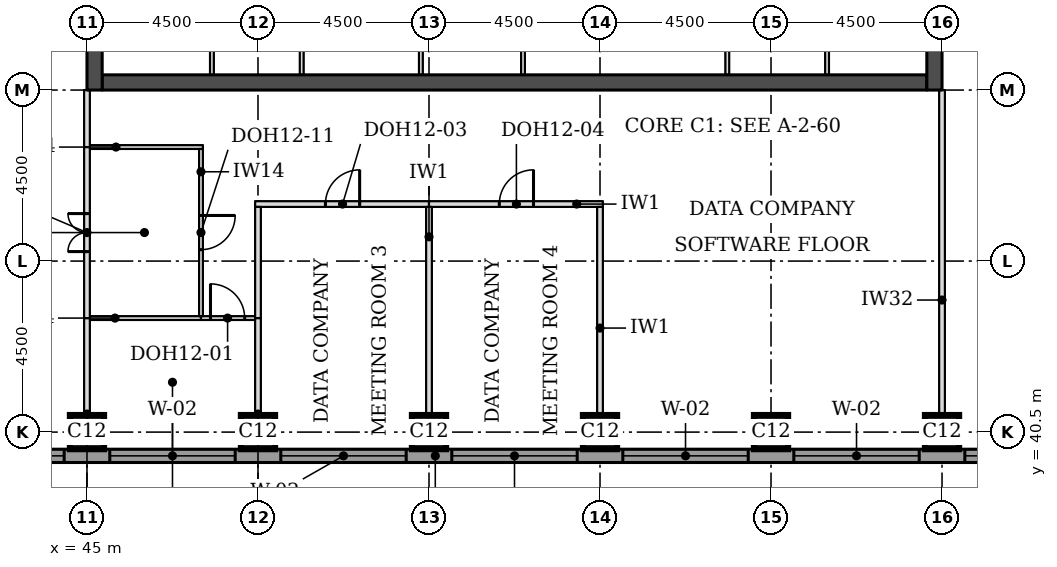
"""IFC4 building model, lengths in metres.
Left out: names, types, materials, properties, quantities, classifications, styles, units other than length and angle.
Written with IfcOpenShell. Run it as: python <this file> out.ifc"""

import sys

from ifc_helpers import new_model, si_unit, direction, frame, frame_2d, origin, origin_2d, place, context, subcontext, project, spatial, rectangle, extrude, element, fill, save


model = new_model("IFC4")
c1 = context("Model", 3, precision=1e-05, world=origin(), true_north=direction((0.0, 1.0)))
c2 = subcontext(c1, "Body", "Model", "MODEL_VIEW")
j1 = project(units=[si_unit("LENGTHUNIT", "METRE"), si_unit("PLANEANGLEUNIT", "RADIAN")], contexts=[c1])
p1 = place(None, origin())
s1 = spatial("IfcSite", under=j1, at=p1, CompositionType="ELEMENT")
p2 = place(p1, origin())
s2 = spatial("IfcBuilding", under=s1, at=p2, CompositionType="ELEMENT")
p3 = place(p2, frame((0.0, 0.0, 248.9)))
s3 = spatial("IfcBuildingStorey", under=s2, at=p3, CompositionType="ELEMENT", Elevation=248.9)
for number, where, z_axis, x_axis in (
    (1, (45.0, 40.5, 0.0), (0.0, 0.0, 1.0), (1.0, 0.0, 0.0)),
    (2, (49.5, 40.5, 0.0), (0.0, 0.0, 1.0), (1.0, 0.0, 0.0)),
    (3, (54.0, 40.5, 0.0), (0.0, 0.0, 1.0), (1.0, 0.0, 0.0)),
    (4, (58.5, 40.5, 0.0), (0.0, 0.0, 1.0), (1.0, 0.0, 0.0)),
    (5, (63.0, 40.5, 0.0), (0.0, 0.0, 1.0), (1.0, 0.0, 0.0)),
    (6, (67.5, 40.5, 0.0), (0.0, 0.0, 1.0), (1.0, 0.0, 0.0)),
):
    element("IfcColumn", number, at=place(p3, frame(where, z_axis=z_axis, x_axis=x_axis)), inside=s3, PredefinedType="COLUMN", context=c2, shape_type="SweptSolid", body=[
        extrude(rectangle(XDim=0.9, YDim=0.9, at=origin_2d()), origin(), (0.0, 0.0, 1.0), 3.7),
    ])
p4 = place(p3, frame((45.4, 49.7, 0.0), z_axis=(0.0, 0.0, 1.0), x_axis=(1.0, 0.0, 0.0)))
e7 = element("IfcWall", 7, at=p4, inside=s3, PredefinedType="SHEAR", context=c2, shape_type="SweptSolid", body=[
    extrude(rectangle(XDim=21.7, YDim=0.4, at=frame_2d((10.85, 0.0))), origin(), (0.0, 0.0, 1.0), 3.7),
])
p5 = place(p3, frame((45.2, 49.5, 0.0), z_axis=(0.0, 0.0, 1.0), x_axis=(0.0, 1.0, 0.0)))
e8 = element("IfcWall", 8, at=p5, inside=s3, PredefinedType="SHEAR", context=c2, shape_type="SweptSolid", body=[
    extrude(rectangle(XDim=22.5, YDim=0.4, at=frame_2d((11.25, 0.0))), origin(), (0.0, 0.0, 1.0), 3.7),
])
p6 = place(p5, frame((4.2, 0.0, 0.0)))
e9 = element("IfcOpeningElement", 9, at=p6, cuts=e8, PredefinedType="OPENING", context=c2, shape_type="SweptSolid", body=[
    extrude(rectangle(XDim=1.8, YDim=2.1, at=frame_2d((0.9, 1.05))), frame((0.0, 0.21, 0.0), z_axis=(0.0, -1.0, 0.0), x_axis=(1.0, 0.0, 0.0)), (0.0, 0.0, 1.0), 0.42),
])
p7 = place(p5, frame((6.9, 0.0, 0.0)))
e10 = element("IfcOpeningElement", 10, at=p7, cuts=e8, PredefinedType="OPENING", context=c2, shape_type="SweptSolid", body=[
    extrude(rectangle(XDim=1.1, YDim=2.1, at=frame_2d((0.55, 1.05))), frame((0.0, 0.21, 0.0), z_axis=(0.0, -1.0, 0.0), x_axis=(1.0, 0.0, 0.0)), (0.0, 0.0, 1.0), 0.42),
])
p8 = place(p5, frame((13.6, 0.0, 0.0)))
e11 = element("IfcOpeningElement", 11, at=p8, cuts=e8, PredefinedType="OPENING", context=c2, shape_type="SweptSolid", body=[
    extrude(rectangle(XDim=1.1, YDim=2.1, at=frame_2d((0.55, 1.05))), frame((0.0, 0.21, 0.0), z_axis=(0.0, -1.0, 0.0), x_axis=(1.0, 0.0, 0.0)), (0.0, 0.0, 1.0), 0.42),
])
p9 = place(p5, frame((16.5, 0.0, 0.0)))
e12 = element("IfcOpeningElement", 12, at=p9, cuts=e8, PredefinedType="OPENING", context=c2, shape_type="SweptSolid", body=[
    extrude(rectangle(XDim=1.8, YDim=2.1, at=frame_2d((0.9, 1.05))), frame((0.0, 0.21, 0.0), z_axis=(0.0, -1.0, 0.0), x_axis=(1.0, 0.0, 0.0)), (0.0, 0.0, 1.0), 0.42),
])
p10 = place(p3, frame((67.3, 49.5, 0.0), z_axis=(0.0, 0.0, 1.0), x_axis=(0.0, 1.0, 0.0)))
e13 = element("IfcWall", 13, at=p10, inside=s3, PredefinedType="SHEAR", context=c2, shape_type="SweptSolid", body=[
    extrude(rectangle(XDim=22.5, YDim=0.4, at=frame_2d((11.25, 0.0))), origin(), (0.0, 0.0, 1.0), 3.7),
])
p11 = place(p10, frame((4.2, 0.0, 0.0)))
e14 = element("IfcOpeningElement", 14, at=p11, cuts=e13, PredefinedType="OPENING", context=c2, shape_type="SweptSolid", body=[
    extrude(rectangle(XDim=1.8, YDim=2.1, at=frame_2d((0.9, 1.05))), frame((0.0, 0.21, 0.0), z_axis=(0.0, -1.0, 0.0), x_axis=(1.0, 0.0, 0.0)), (0.0, 0.0, 1.0), 0.42),
])
p12 = place(p10, frame((6.9, 0.0, 0.0)))
e15 = element("IfcOpeningElement", 15, at=p12, cuts=e13, PredefinedType="OPENING", context=c2, shape_type="SweptSolid", body=[
    extrude(rectangle(XDim=1.1, YDim=2.1, at=frame_2d((0.55, 1.05))), frame((0.0, 0.21, 0.0), z_axis=(0.0, -1.0, 0.0), x_axis=(1.0, 0.0, 0.0)), (0.0, 0.0, 1.0), 0.42),
])
p13 = place(p10, frame((13.6, 0.0, 0.0)))
e16 = element("IfcOpeningElement", 16, at=p13, cuts=e13, PredefinedType="OPENING", context=c2, shape_type="SweptSolid", body=[
    extrude(rectangle(XDim=1.1, YDim=2.1, at=frame_2d((0.55, 1.05))), frame((0.0, 0.21, 0.0), z_axis=(0.0, -1.0, 0.0), x_axis=(1.0, 0.0, 0.0)), (0.0, 0.0, 1.0), 0.42),
])
p14 = place(p10, frame((16.5, 0.0, 0.0)))
e17 = element("IfcOpeningElement", 17, at=p14, cuts=e13, PredefinedType="OPENING", context=c2, shape_type="SweptSolid", body=[
    extrude(rectangle(XDim=1.8, YDim=2.1, at=frame_2d((0.9, 1.05))), frame((0.0, 0.21, 0.0), z_axis=(0.0, -1.0, 0.0), x_axis=(1.0, 0.0, 0.0)), (0.0, 0.0, 1.0), 0.42),
])
p15 = place(p3, frame((36.0, 39.875, 0.0), z_axis=(0.0, 0.0, 1.0), x_axis=(1.0, 0.0, 0.0)))
e18 = element("IfcWall", 18, at=p15, inside=s3, PredefinedType="STANDARD", context=c2, shape_type="SweptSolid", body=[
    extrude(rectangle(XDim=36.331, YDim=0.35, at=frame_2d((18.166, 0.0))), origin(), (0.0, 0.0, 1.0), 3.525),
])
p16 = place(p15, frame((0.6, 0.0, 0.9)))
e19 = element("IfcOpeningElement", 19, at=p16, cuts=e18, PredefinedType="OPENING", context=c2, shape_type="SweptSolid", body=[
    extrude(rectangle(XDim=3.3, YDim=1.9, at=frame_2d((1.65, 0.95))), frame((0.0, 0.185, 0.0), z_axis=(0.0, -1.0, 0.0), x_axis=(1.0, 0.0, 0.0)), (0.0, 0.0, 1.0), 0.37),
])
p17 = place(p15, frame((5.1, 0.0, 0.9)))
e20 = element("IfcOpeningElement", 20, at=p17, cuts=e18, PredefinedType="OPENING", context=c2, shape_type="SweptSolid", body=[
    extrude(rectangle(XDim=3.3, YDim=1.9, at=frame_2d((1.65, 0.95))), frame((0.0, 0.185, 0.0), z_axis=(0.0, -1.0, 0.0), x_axis=(1.0, 0.0, 0.0)), (0.0, 0.0, 1.0), 0.37),
])
p18 = place(p15, frame((9.6, 0.0, 0.9)))
e21 = element("IfcOpeningElement", 21, at=p18, cuts=e18, PredefinedType="OPENING", context=c2, shape_type="SweptSolid", body=[
    extrude(rectangle(XDim=3.3, YDim=1.9, at=frame_2d((1.65, 0.95))), frame((0.0, 0.185, 0.0), z_axis=(0.0, -1.0, 0.0), x_axis=(1.0, 0.0, 0.0)), (0.0, 0.0, 1.0), 0.37),
])
p19 = place(p15, frame((14.1, 0.0, 0.9)))
e22 = element("IfcOpeningElement", 22, at=p19, cuts=e18, PredefinedType="OPENING", context=c2, shape_type="SweptSolid", body=[
    extrude(rectangle(XDim=3.3, YDim=1.9, at=frame_2d((1.65, 0.95))), frame((0.0, 0.185, 0.0), z_axis=(0.0, -1.0, 0.0), x_axis=(1.0, 0.0, 0.0)), (0.0, 0.0, 1.0), 0.37),
])
p20 = place(p15, frame((18.6, 0.0, 0.9)))
e23 = element("IfcOpeningElement", 23, at=p20, cuts=e18, PredefinedType="OPENING", context=c2, shape_type="SweptSolid", body=[
    extrude(rectangle(XDim=3.3, YDim=1.9, at=frame_2d((1.65, 0.95))), frame((0.0, 0.185, 0.0), z_axis=(0.0, -1.0, 0.0), x_axis=(1.0, 0.0, 0.0)), (0.0, 0.0, 1.0), 0.37),
])
p21 = place(p15, frame((23.1, 0.0, 0.9)))
e24 = element("IfcOpeningElement", 24, at=p21, cuts=e18, PredefinedType="OPENING", context=c2, shape_type="SweptSolid", body=[
    extrude(rectangle(XDim=3.3, YDim=1.9, at=frame_2d((1.65, 0.95))), frame((0.0, 0.185, 0.0), z_axis=(0.0, -1.0, 0.0), x_axis=(1.0, 0.0, 0.0)), (0.0, 0.0, 1.0), 0.37),
])
p22 = place(p15, frame((27.6, 0.0, 0.9)))
e25 = element("IfcOpeningElement", 25, at=p22, cuts=e18, PredefinedType="OPENING", context=c2, shape_type="SweptSolid", body=[
    extrude(rectangle(XDim=3.3, YDim=1.9, at=frame_2d((1.65, 0.95))), frame((0.0, 0.185, 0.0), z_axis=(0.0, -1.0, 0.0), x_axis=(1.0, 0.0, 0.0)), (0.0, 0.0, 1.0), 0.37),
])
p23 = place(p15, frame((32.1, 0.0, 0.9)))
e26 = element("IfcOpeningElement", 26, at=p23, cuts=e18, PredefinedType="OPENING", context=c2, shape_type="SweptSolid", body=[
    extrude(rectangle(XDim=3.3, YDim=1.9, at=frame_2d((1.65, 0.95))), frame((0.0, 0.185, 0.0), z_axis=(0.0, -1.0, 0.0), x_axis=(1.0, 0.0, 0.0)), (0.0, 0.0, 1.0), 0.37),
])
p24 = place(p3, frame((45.075, 43.5, 0.0), z_axis=(0.0, 0.0, 1.0), x_axis=(1.0, 0.0, 0.0)))
e27 = element("IfcWall", 27, at=p24, inside=s3, PredefinedType="PARTITIONING", context=c2, shape_type="SweptSolid", body=[
    extrude(rectangle(XDim=2.925, YDim=0.1, at=frame_2d((1.462, 0.0))), origin(), (0.0, 0.0, 1.0), 3.55),
])
p25 = place(p3, frame((48.0, 43.5, 0.0), z_axis=(0.0, 0.0, 1.0), x_axis=(1.0, 0.0, 0.0)))
e28 = element("IfcWall", 28, at=p25, inside=s3, PredefinedType="PARTITIONING", context=c2, shape_type="SweptSolid", body=[
    extrude(rectangle(XDim=1.425, YDim=0.1, at=frame_2d((0.712, 0.0))), origin(), (0.0, 0.0, 1.0), 3.55),
])
p26 = place(p25, frame((0.25, 0.0, 0.0)))
e29 = element("IfcOpeningElement", 29, at=p26, cuts=e28, PredefinedType="OPENING", context=c2, shape_type="SweptSolid", body=[
    extrude(rectangle(XDim=0.9, YDim=2.1, at=frame_2d((0.45, 1.05))), frame((0.0, 0.06, 0.0), z_axis=(0.0, -1.0, 0.0), x_axis=(1.0, 0.0, 0.0)), (0.0, 0.0, 1.0), 0.12),
])
p27 = place(p3, frame((49.425, 46.5, 0.0), z_axis=(0.0, 0.0, 1.0), x_axis=(1.0, 0.0, 0.0)))
e30 = element("IfcWall", 30, at=p27, inside=s3, PredefinedType="PARTITIONING", context=c2, shape_type="SweptSolid", body=[
    extrude(rectangle(XDim=4.575, YDim=0.15, at=frame_2d((2.288, 0.0))), origin(), (0.0, 0.0, 1.0), 3.55),
])
p28 = place(p27, frame((1.85, 0.0, 0.0)))
e31 = element("IfcOpeningElement", 31, at=p28, cuts=e30, PredefinedType="OPENING", context=c2, shape_type="SweptSolid", body=[
    extrude(rectangle(XDim=0.9, YDim=2.1, at=frame_2d((0.45, 1.05))), frame((0.0, 0.085, 0.0), z_axis=(0.0, -1.0, 0.0), x_axis=(1.0, 0.0, 0.0)), (0.0, 0.0, 1.0), 0.17),
])
p29 = place(p3, frame((54.0, 46.5, 0.0), z_axis=(0.0, 0.0, 1.0), x_axis=(1.0, 0.0, 0.0)))
e32 = element("IfcWall", 32, at=p29, inside=s3, PredefinedType="PARTITIONING", context=c2, shape_type="SweptSolid", body=[
    extrude(rectangle(XDim=4.575, YDim=0.15, at=frame_2d((2.288, 0.0))), origin(), (0.0, 0.0, 1.0), 3.55),
])
p30 = place(p29, frame((1.85, 0.0, 0.0)))
e33 = element("IfcOpeningElement", 33, at=p30, cuts=e32, PredefinedType="OPENING", context=c2, shape_type="SweptSolid", body=[
    extrude(rectangle(XDim=0.9, YDim=2.1, at=frame_2d((0.45, 1.05))), frame((0.0, 0.085, 0.0), z_axis=(0.0, -1.0, 0.0), x_axis=(1.0, 0.0, 0.0)), (0.0, 0.0, 1.0), 0.17),
])
p31 = place(p3, frame((45.075, 48.0, 0.0), z_axis=(0.0, 0.0, 1.0), x_axis=(1.0, 0.0, 0.0)))
e34 = element("IfcWall", 34, at=p31, inside=s3, PredefinedType="PARTITIONING", context=c2, shape_type="SweptSolid", body=[
    extrude(rectangle(XDim=2.975, YDim=0.1, at=frame_2d((1.488, 0.0))), origin(), (0.0, 0.0, 1.0), 3.55),
])
p32 = place(p3, frame((45.0, 40.05, 0.0), z_axis=(0.0, 0.0, 1.0), x_axis=(0.0, 1.0, 0.0)))
e35 = element("IfcWall", 35, at=p32, inside=s3, PredefinedType="PARTITIONING", context=c2, shape_type="SweptSolid", body=[
    extrude(rectangle(XDim=3.45, YDim=0.15, at=frame_2d((1.725, 0.0))), origin(), (0.0, 0.0, 1.0), 3.022),
])
p33 = place(p3, frame((49.5, 40.05, 0.0), z_axis=(0.0, 0.0, 1.0), x_axis=(0.0, 1.0, 0.0)))
e36 = element("IfcWall", 36, at=p33, inside=s3, PredefinedType="PARTITIONING", context=c2, shape_type="SweptSolid", body=[
    extrude(rectangle(XDim=3.45, YDim=0.15, at=frame_2d((1.725, 0.0))), origin(), (0.0, 0.0, 1.0), 3.55),
])
for number, where, z_axis, x_axis in (
    (37, (54.0, 40.05, 0.0), (0.0, 0.0, 1.0), (0.0, 1.0, 0.0)),
    (38, (58.5, 40.05, 0.0), (0.0, 0.0, 1.0), (0.0, 1.0, 0.0)),
):
    element("IfcWall", number, at=place(p3, frame(where, z_axis=z_axis, x_axis=x_axis)), inside=s3, PredefinedType="PARTITIONING", context=c2, shape_type="SweptSolid", body=[
        extrude(rectangle(XDim=6.375, YDim=0.15, at=frame_2d((3.188, 0.0))), origin(), (0.0, 0.0, 1.0), 3.55),
    ])
p34 = place(p3, frame((67.5, 40.05, 0.0), z_axis=(0.0, 0.0, 1.0), x_axis=(0.0, 1.0, 0.0)))
e39 = element("IfcWall", 39, at=p34, inside=s3, PredefinedType="PARTITIONING", context=c2, shape_type="SweptSolid", body=[
    extrude(rectangle(XDim=9.45, YDim=0.15, at=frame_2d((4.725, 0.0))), origin(), (0.0, 0.0, 1.0), 3.022),
])
p35 = place(p3, frame((45.0, 43.5, 0.0), z_axis=(0.0, 0.0, 1.0), x_axis=(0.0, 1.0, 0.0)))
e40 = element("IfcWall", 40, at=p35, inside=s3, PredefinedType="PARTITIONING", context=c2, shape_type="SweptSolid", body=[
    extrude(rectangle(XDim=4.5, YDim=0.15, at=frame_2d((2.25, 0.0))), origin(), (0.0, 0.0, 1.0), 3.022),
])
p36 = place(p35, frame((1.75, 0.0, 0.0)))
e41 = element("IfcOpeningElement", 41, at=p36, cuts=e40, PredefinedType="OPENING", context=c2, shape_type="SweptSolid", body=[
    extrude(rectangle(XDim=1.0, YDim=2.1, at=frame_2d((0.5, 1.05))), frame((0.0, 0.085, 0.0), z_axis=(0.0, -1.0, 0.0), x_axis=(1.0, 0.0, 0.0)), (0.0, 0.0, 1.0), 0.17),
])
p37 = place(p3, frame((49.5, 43.5, 0.0), z_axis=(0.0, 0.0, 1.0), x_axis=(0.0, 1.0, 0.0)))
e42 = element("IfcWall", 42, at=p37, inside=s3, PredefinedType="PARTITIONING", context=c2, shape_type="SweptSolid", body=[
    extrude(rectangle(XDim=2.925, YDim=0.15, at=frame_2d((1.462, 0.0))), origin(), (0.0, 0.0, 1.0), 3.55),
])
p38 = place(p3, frame((48.0, 43.55, 0.0), z_axis=(0.0, 0.0, 1.0), x_axis=(0.0, 1.0, 0.0)))
e43 = element("IfcWall", 43, at=p38, inside=s3, PredefinedType="PARTITIONING", context=c2, shape_type="SweptSolid", body=[
    extrude(rectangle(XDim=4.4, YDim=0.1, at=frame_2d((2.2, 0.0))), origin(), (0.0, 0.0, 1.0), 3.55),
])
p39 = place(p38, frame((1.75, 0.0, 0.0)))
e44 = element("IfcOpeningElement", 44, at=p39, cuts=e43, PredefinedType="OPENING", context=c2, shape_type="SweptSolid", body=[
    extrude(rectangle(XDim=0.9, YDim=2.1, at=frame_2d((0.45, 1.05))), frame((0.0, 0.06, 0.0), z_axis=(0.0, -1.0, 0.0), x_axis=(1.0, 0.0, 0.0)), (0.0, 0.0, 1.0), 0.12),
])
p40 = place(p3, frame((45.0, 48.0, 0.0), z_axis=(0.0, 0.0, 1.0), x_axis=(0.0, 1.0, 0.0)))
e45 = element("IfcWall", 45, at=p40, inside=s3, PredefinedType="PARTITIONING", context=c2, shape_type="SweptSolid", body=[
    extrude(rectangle(XDim=1.5, YDim=0.15, at=frame_2d((0.75, 0.0))), origin(), (0.0, 0.0, 1.0), 3.022),
])
for number, where, z_axis, x_axis in (
    (46, (48.288, 49.9, 0.0), (0.0, 0.0, 1.0), (0.0, 1.0, 0.0)),
    (47, (50.65, 49.9, 0.0), (0.0, 0.0, 1.0), (0.0, 1.0, 0.0)),
    (48, (53.786, 49.9, 0.0), (0.0, 0.0, 1.0), (0.0, 1.0, 0.0)),
    (49, (56.474, 49.9, 0.0), (0.0, 0.0, 1.0), (0.0, 1.0, 0.0)),
    (50, (61.85, 49.9, 0.0), (0.0, 0.0, 1.0), (0.0, 1.0, 0.0)),
    (51, (64.475, 49.9, 0.0), (0.0, 0.0, 1.0), (0.0, 1.0, 0.0)),
):
    element("IfcWall", number, at=place(p3, frame(where, z_axis=z_axis, x_axis=x_axis)), inside=s3, PredefinedType="PARTITIONING", context=c2, shape_type="SweptSolid", body=[
        extrude(rectangle(XDim=3.1, YDim=0.1, at=frame_2d((1.55, 0.0))), origin(), (0.0, 0.0, 1.0), 3.55),
    ])
p41 = place(p17, origin())
e52 = element("IfcWindow", 52, at=p41, inside=s3, PartitioningType="SINGLE_PANEL", PredefinedType="WINDOW", context=c2, shape_type="SweptSolid", body=[
    extrude(rectangle(XDim=3.3, YDim=1.9, at=frame_2d((1.65, 0.95))), frame((0.0, 0.085, 0.0), z_axis=(0.0, -1.0, 0.0), x_axis=(1.0, 0.0, 0.0)), (0.0, 0.0, 1.0), 0.06),
])
fill(e20, e52)
p42 = place(p18, origin())
e53 = element("IfcWindow", 53, at=p42, inside=s3, PartitioningType="SINGLE_PANEL", PredefinedType="WINDOW", context=c2, shape_type="SweptSolid", body=[
    extrude(rectangle(XDim=3.3, YDim=1.9, at=frame_2d((1.65, 0.95))), frame((0.0, 0.085, 0.0), z_axis=(0.0, -1.0, 0.0), x_axis=(1.0, 0.0, 0.0)), (0.0, 0.0, 1.0), 0.06),
])
fill(e21, e53)
p43 = place(p19, origin())
e54 = element("IfcWindow", 54, at=p43, inside=s3, PartitioningType="SINGLE_PANEL", PredefinedType="WINDOW", context=c2, shape_type="SweptSolid", body=[
    extrude(rectangle(XDim=3.3, YDim=1.9, at=frame_2d((1.65, 0.95))), frame((0.0, 0.085, 0.0), z_axis=(0.0, -1.0, 0.0), x_axis=(1.0, 0.0, 0.0)), (0.0, 0.0, 1.0), 0.06),
])
fill(e22, e54)
p44 = place(p20, origin())
e55 = element("IfcWindow", 55, at=p44, inside=s3, PartitioningType="SINGLE_PANEL", PredefinedType="WINDOW", context=c2, shape_type="SweptSolid", body=[
    extrude(rectangle(XDim=3.3, YDim=1.9, at=frame_2d((1.65, 0.95))), frame((0.0, 0.085, 0.0), z_axis=(0.0, -1.0, 0.0), x_axis=(1.0, 0.0, 0.0)), (0.0, 0.0, 1.0), 0.06),
])
fill(e23, e55)
p45 = place(p21, origin())
e56 = element("IfcWindow", 56, at=p45, inside=s3, PartitioningType="SINGLE_PANEL", PredefinedType="WINDOW", context=c2, shape_type="SweptSolid", body=[
    extrude(rectangle(XDim=3.3, YDim=1.9, at=frame_2d((1.65, 0.95))), frame((0.0, 0.085, 0.0), z_axis=(0.0, -1.0, 0.0), x_axis=(1.0, 0.0, 0.0)), (0.0, 0.0, 1.0), 0.06),
])
fill(e24, e56)
p46 = place(p22, origin())
e57 = element("IfcWindow", 57, at=p46, inside=s3, PartitioningType="SINGLE_PANEL", PredefinedType="WINDOW", context=c2, shape_type="SweptSolid", body=[
    extrude(rectangle(XDim=3.3, YDim=1.9, at=frame_2d((1.65, 0.95))), frame((0.0, 0.085, 0.0), z_axis=(0.0, -1.0, 0.0), x_axis=(1.0, 0.0, 0.0)), (0.0, 0.0, 1.0), 0.06),
])
fill(e25, e57)
p47 = place(p23, origin())
e58 = element("IfcWindow", 58, at=p47, inside=s3, PartitioningType="SINGLE_PANEL", PredefinedType="WINDOW", context=c2, shape_type="SweptSolid", body=[
    extrude(rectangle(XDim=3.3, YDim=1.9, at=frame_2d((1.65, 0.95))), frame((0.0, 0.085, 0.0), z_axis=(0.0, -1.0, 0.0), x_axis=(1.0, 0.0, 0.0)), (0.0, 0.0, 1.0), 0.06),
])
fill(e26, e58)
p48 = place(p36, origin())
e59 = element("IfcDoor", 59, at=p48, inside=s3, OperationType="DOUBLE_DOOR_SINGLE_SWING", PredefinedType="DOOR", context=c2, shape_type="SweptSolid", body=[
    extrude(rectangle(XDim=1.0, YDim=2.1, at=frame_2d((0.5, 1.05))), frame((0.0, 0.025, 0.0), z_axis=(0.0, -1.0, 0.0), x_axis=(1.0, 0.0, 0.0)), (0.0, 0.0, 1.0), 0.05),
])
fill(e41, e59)
p49 = place(p39, frame((0.9, 0.0, 0.0), z_axis=(0.0, 0.0, 1.0), x_axis=(-1.0, 0.0, 0.0)))
e60 = element("IfcDoor", 60, at=p49, inside=s3, OperationType="SINGLE_SWING_LEFT", PredefinedType="DOOR", context=c2, shape_type="SweptSolid", body=[
    extrude(rectangle(XDim=0.9, YDim=2.1, at=frame_2d((0.45, 1.05))), frame((0.0, 0.025, 0.0), z_axis=(0.0, -1.0, 0.0), x_axis=(1.0, 0.0, 0.0)), (0.0, 0.0, 1.0), 0.05),
])
fill(e44, e60)
p50 = place(p28, origin())
e61 = element("IfcDoor", 61, at=p50, inside=s3, OperationType="SINGLE_SWING_RIGHT", PredefinedType="DOOR", context=c2, shape_type="SweptSolid", body=[
    extrude(rectangle(XDim=0.9, YDim=2.1, at=frame_2d((0.45, 1.05))), frame((0.0, 0.025, 0.0), z_axis=(0.0, -1.0, 0.0), x_axis=(1.0, 0.0, 0.0)), (0.0, 0.0, 1.0), 0.05),
])
fill(e31, e61)
p51 = place(p30, origin())
e62 = element("IfcDoor", 62, at=p51, inside=s3, OperationType="SINGLE_SWING_RIGHT", PredefinedType="DOOR", context=c2, shape_type="SweptSolid", body=[
    extrude(rectangle(XDim=0.9, YDim=2.1, at=frame_2d((0.45, 1.05))), frame((0.0, 0.025, 0.0), z_axis=(0.0, -1.0, 0.0), x_axis=(1.0, 0.0, 0.0)), (0.0, 0.0, 1.0), 0.05),
])
fill(e33, e62)
p52 = place(p26, origin())
e63 = element("IfcDoor", 63, at=p52, inside=s3, OperationType="SINGLE_SWING_LEFT", PredefinedType="DOOR", context=c2, shape_type="SweptSolid", body=[
    extrude(rectangle(XDim=0.9, YDim=2.1, at=frame_2d((0.45, 1.05))), frame((0.0, 0.025, 0.0), z_axis=(0.0, -1.0, 0.0), x_axis=(1.0, 0.0, 0.0)), (0.0, 0.0, 1.0), 0.05),
])
fill(e29, e63)
save(model, sys.argv[1])
